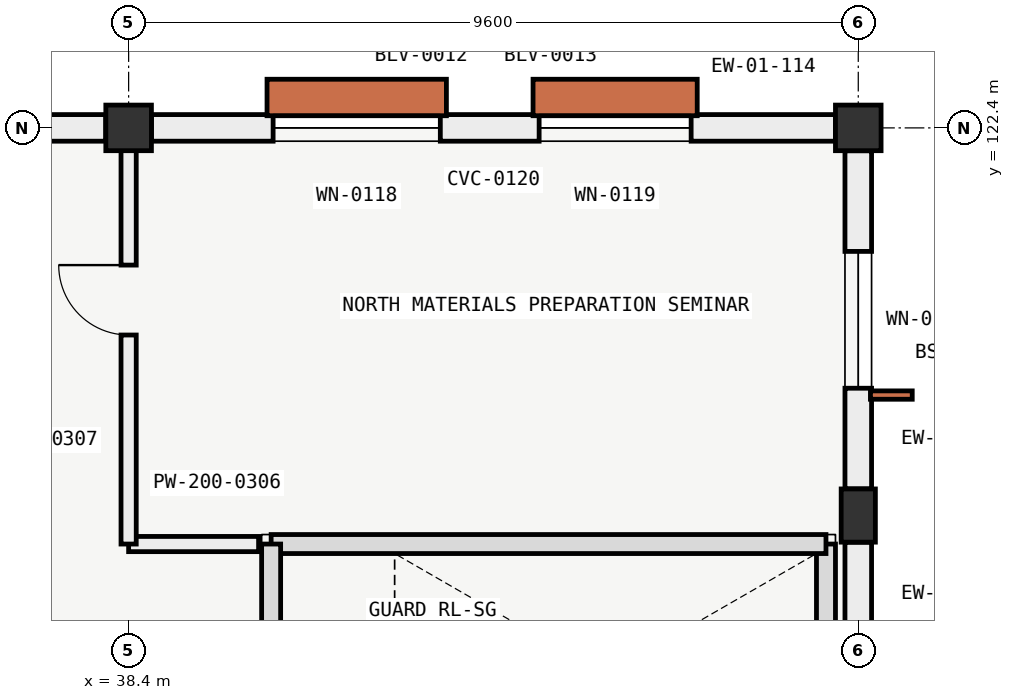
"""IFC4 building model, lengths in metres.
Left out: names, types, materials, properties, quantities, classifications, styles, units other than length and angle.
Written with IfcOpenShell. Run it as: python <this file> out.ifc"""

import sys

from ifc_helpers import new_model, si_unit, direction, frame, frame_2d, origin, origin_2d, place, context, subcontext, project, spatial, rectangle, extrude, element, fill, save


model = new_model("IFC4")
c1 = context("Model", 3, precision=1e-05, world=origin(), true_north=direction((0.0, 1.0)))
c2 = subcontext(c1, "Body", "Model", "MODEL_VIEW")
j1 = project(units=[si_unit("LENGTHUNIT", "METRE"), si_unit("PLANEANGLEUNIT", "RADIAN")], contexts=[c1])
p1 = place(None, origin())
s1 = spatial("IfcSite", under=j1, at=p1, CompositionType="ELEMENT")
p2 = place(p1, origin())
s2 = spatial("IfcBuilding", under=s1, at=p2, CompositionType="ELEMENT")
p3 = place(p2, frame((0.0, 0.0, 9.6)))
s3 = spatial("IfcBuildingStorey", under=s2, at=p3, CompositionType="ELEMENT", Elevation=9.6)
for number, where, z_axis, x_axis in (
    (1, (38.4, 122.4, 0.0), (0.0, 0.0, 1.0), (1.0, 0.0, 0.0)),
    (2, (48.0, 122.4, 0.0), (0.0, 0.0, 1.0), (1.0, 0.0, 0.0)),
):
    element("IfcColumn", number, at=place(p3, frame(where, z_axis=z_axis, x_axis=x_axis)), inside=s3, PredefinedType="COLUMN", context=c2, shape_type="SweptSolid", body=[
        extrude(rectangle(XDim=0.6, YDim=0.6, at=origin_2d()), origin(), (0.0, 0.0, 1.0), 4.2),
    ])
p4 = place(p3, frame((48.0, 117.3, 0.0), z_axis=(0.0, 0.0, 1.0), x_axis=(1.0, 0.0, 0.0)))
e3 = element("IfcColumn", 3, at=p4, inside=s3, PredefinedType="PILASTER", context=c2, shape_type="SweptSolid", body=[
    extrude(rectangle(XDim=0.45, YDim=0.7, at=origin_2d()), origin(), (0.0, 0.0, 1.0), 4.2),
])
p5 = place(p3, frame((48.0, 116.949, 0.0), z_axis=(0.0, 0.0, 1.0), x_axis=(0.0, -1.0, 0.0)))
e4 = element("IfcWall", 4, at=p5, inside=s3, PredefinedType="SOLIDWALL", context=c2, shape_type="SweptSolid", body=[
    extrude(rectangle(XDim=4.448, YDim=0.35, at=frame_2d((2.224, 0.0))), origin(), (0.0, 0.0, 1.0), 3.32),
])
p6 = place(p5, frame((1.349, 0.0, 0.95)))
e5 = element("IfcOpeningElement", 5, at=p6, cuts=e4, PredefinedType="OPENING", context=c2, shape_type="SweptSolid", body=[
    extrude(rectangle(XDim=1.75, YDim=2.05, at=frame_2d((0.875, 1.025))), frame((0.0, 0.185, 0.0), z_axis=(0.0, -1.0, 0.0), x_axis=(1.0, 0.0, 0.0)), (0.0, 0.0, 1.0), 0.37),
])
p7 = place(p3, frame((48.0, 122.099, 0.0), z_axis=(0.0, 0.0, 1.0), x_axis=(0.0, -1.0, 0.0)))
e6 = element("IfcWall", 6, at=p7, inside=s3, PredefinedType="SOLIDWALL", context=c2, shape_type="SweptSolid", body=[
    extrude(rectangle(XDim=4.448, YDim=0.35, at=frame_2d((2.224, 0.0))), origin(), (0.0, 0.0, 1.0), 3.32),
])
p8 = place(p7, frame((1.324, 0.0, 0.95)))
e7 = element("IfcOpeningElement", 7, at=p8, cuts=e6, PredefinedType="OPENING", context=c2, shape_type="SweptSolid", body=[
    extrude(rectangle(XDim=1.8, YDim=2.1, at=frame_2d((0.9, 1.05))), frame((0.0, 0.185, 0.0), z_axis=(0.0, -1.0, 0.0), x_axis=(1.0, 0.0, 0.0)), (0.0, 0.0, 1.0), 0.37),
])
p9 = place(p3, frame((35.4, 122.4, 0.0), z_axis=(0.0, 0.0, 1.0), x_axis=(1.0, 0.0, 0.0)))
e8 = element("IfcWall", 8, at=p9, inside=s3, PredefinedType="SOLIDWALL", context=c2, shape_type="SweptSolid", body=[
    extrude(rectangle(XDim=2.699, YDim=0.35, at=frame_2d((1.35, 0.0))), origin(), (0.0, 0.0, 1.0), 3.32),
])
p10 = place(p9, frame((0.899, 0.0, 0.85)))
e9 = element("IfcOpeningElement", 9, at=p10, cuts=e8, PredefinedType="OPENING", context=c2, shape_type="SweptSolid", body=[
    extrude(rectangle(XDim=0.9, YDim=2.2, at=frame_2d((0.45, 1.1))), frame((0.0, 0.185, 0.0), z_axis=(0.0, -1.0, 0.0), x_axis=(1.0, 0.0, 0.0)), (0.0, 0.0, 1.0), 0.37),
])
p11 = place(p3, frame((38.701, 122.4, 0.0), z_axis=(0.0, 0.0, 1.0), x_axis=(1.0, 0.0, 0.0)))
e10 = element("IfcWall", 10, at=p11, inside=s3, PredefinedType="SOLIDWALL", context=c2, shape_type="SweptSolid", body=[
    extrude(rectangle(XDim=8.998, YDim=0.35, at=frame_2d((4.499, 0.0))), origin(), (0.0, 0.0, 1.0), 3.32),
])
p12 = place(p11, frame((1.6, 0.0, 0.85)))
e11 = element("IfcOpeningElement", 11, at=p12, cuts=e10, PredefinedType="OPENING", context=c2, shape_type="SweptSolid", body=[
    extrude(rectangle(XDim=2.2, YDim=2.3, at=frame_2d((1.1, 1.15))), frame((0.0, 0.185, 0.0), z_axis=(0.0, -1.0, 0.0), x_axis=(1.0, 0.0, 0.0)), (0.0, 0.0, 1.0), 0.37),
])
p13 = place(p11, frame((5.1, 0.0, 0.85)))
e12 = element("IfcOpeningElement", 12, at=p13, cuts=e10, PredefinedType="OPENING", context=c2, shape_type="SweptSolid", body=[
    extrude(rectangle(XDim=2.0, YDim=1.35, at=frame_2d((1.0, 0.675))), frame((0.0, 0.185, 0.0), z_axis=(0.0, -1.0, 0.0), x_axis=(1.0, 0.0, 0.0)), (0.0, 0.0, 1.0), 0.37),
])
p14 = place(p3, frame((47.575, 113.475, 0.0), z_axis=(0.0, 0.0, 1.0), x_axis=(0.0, 1.0, 0.0)))
e13 = element("IfcWall", 13, at=p14, inside=s3, PredefinedType="SOLIDWALL", context=c2, shape_type="SweptSolid", body=[
    extrude(rectangle(XDim=3.45, YDim=0.25, at=frame_2d((1.725, 0.0))), origin(), (0.0, 0.0, 1.0), 3.15),
])
p15 = place(p3, frame((47.575, 116.925, 0.0), z_axis=(0.0, 0.0, 1.0), x_axis=(-1.0, 0.0, 0.0)))
e14 = element("IfcWall", 14, at=p15, inside=s3, PredefinedType="SOLIDWALL", context=c2, shape_type="SweptSolid", body=[
    extrude(rectangle(XDim=7.3, YDim=0.25, at=frame_2d((3.65, 0.0))), origin(), (0.0, 0.0, 1.0), 3.15),
])
p16 = place(p3, frame((40.275, 116.925, 0.0), z_axis=(0.0, 0.0, 1.0), x_axis=(0.0, -1.0, 0.0)))
e15 = element("IfcWall", 15, at=p16, inside=s3, PredefinedType="SOLIDWALL", context=c2, shape_type="SweptSolid", body=[
    extrude(rectangle(XDim=3.45, YDim=0.25, at=frame_2d((1.725, 0.0))), origin(), (0.0, 0.0, 1.0), 3.15),
])
p17 = place(p16, frame((1.175, 0.0, 0.0)))
e16 = element("IfcOpeningElement", 16, at=p17, cuts=e15, PredefinedType="OPENING", context=c2, shape_type="SweptSolid", body=[
    extrude(rectangle(XDim=1.1, YDim=2.2, at=frame_2d((0.55, 1.1))), frame((0.0, 0.135, 0.0), z_axis=(0.0, -1.0, 0.0), x_axis=(1.0, 0.0, 0.0)), (0.0, 0.0, 1.0), 0.27),
])
p18 = place(p3, frame((38.4, 116.925, 0.0), z_axis=(0.0, 0.0, 1.0), x_axis=(1.0, 0.0, 0.0)))
e17 = element("IfcWall", 17, at=p18, inside=s3, PredefinedType="PARTITIONING", context=c2, shape_type="SweptSolid", body=[
    extrude(rectangle(XDim=1.71, YDim=0.2, at=frame_2d((0.855, 0.0))), origin(), (0.0, 0.0, 1.0), 3.85),
])
p19 = place(p3, frame((38.4, 116.925, 0.0), z_axis=(0.0, 0.0, 1.0), x_axis=(0.0, 1.0, 0.0)))
e18 = element("IfcWall", 18, at=p19, inside=s3, PredefinedType="PARTITIONING", context=c2, shape_type="SweptSolid", body=[
    extrude(rectangle(XDim=5.325, YDim=0.2, at=frame_2d((2.663, 0.0))), origin(), (0.0, 0.0, 1.0), 3.85),
])
p20 = place(p19, frame((2.75, 0.0, 0.0)))
e19 = element("IfcOpeningElement", 19, at=p20, cuts=e18, PredefinedType="OPENING", context=c2, shape_type="SweptSolid", body=[
    extrude(rectangle(XDim=0.92, YDim=2.1, at=frame_2d((0.46, 1.05))), frame((0.0, 0.11, 0.0), z_axis=(0.0, -1.0, 0.0), x_axis=(1.0, 0.0, 0.0)), (0.0, 0.0, 1.0), 0.22),
])
p21 = place(p8, origin())
e20 = element("IfcWindow", 20, at=p21, inside=s3, PartitioningType="SINGLE_PANEL", PredefinedType="WINDOW", context=c2, shape_type="SweptSolid", body=[
    extrude(rectangle(XDim=1.8, YDim=2.1, at=frame_2d((0.9, 1.05))), frame((0.0, 0.03, 0.0), z_axis=(0.0, -1.0, 0.0), x_axis=(1.0, 0.0, 0.0)), (0.0, 0.0, 1.0), 0.06),
])
fill(e7, e20)
p22 = place(p12, origin())
e21 = element("IfcWindow", 21, at=p22, inside=s3, PartitioningType="SINGLE_PANEL", PredefinedType="WINDOW", context=c2, shape_type="SweptSolid", body=[
    extrude(rectangle(XDim=2.2, YDim=2.3, at=frame_2d((1.1, 1.15))), frame((0.0, 0.03, 0.0), z_axis=(0.0, -1.0, 0.0), x_axis=(1.0, 0.0, 0.0)), (0.0, 0.0, 1.0), 0.06),
])
fill(e11, e21)
p23 = place(p13, origin())
e22 = element("IfcWindow", 22, at=p23, inside=s3, PartitioningType="SINGLE_PANEL", PredefinedType="WINDOW", context=c2, shape_type="SweptSolid", body=[
    extrude(rectangle(XDim=2.0, YDim=1.35, at=frame_2d((1.0, 0.675))), frame((0.0, 0.03, 0.0), z_axis=(0.0, -1.0, 0.0), x_axis=(1.0, 0.0, 0.0)), (0.0, 0.0, 1.0), 0.06),
])
fill(e12, e22)
p24 = place(p20, origin())
e23 = element("IfcDoor", 23, at=p24, inside=s3, OperationType="SINGLE_SWING_RIGHT", PredefinedType="DOOR", context=c2, shape_type="SweptSolid", body=[
    extrude(rectangle(XDim=0.92, YDim=2.1, at=frame_2d((0.46, 1.05))), frame((0.0, 0.025, 0.0), z_axis=(0.0, -1.0, 0.0), x_axis=(1.0, 0.0, 0.0)), (0.0, 0.0, 1.0), 0.05),
])
fill(e19, e23)
save(model, sys.argv[1])
